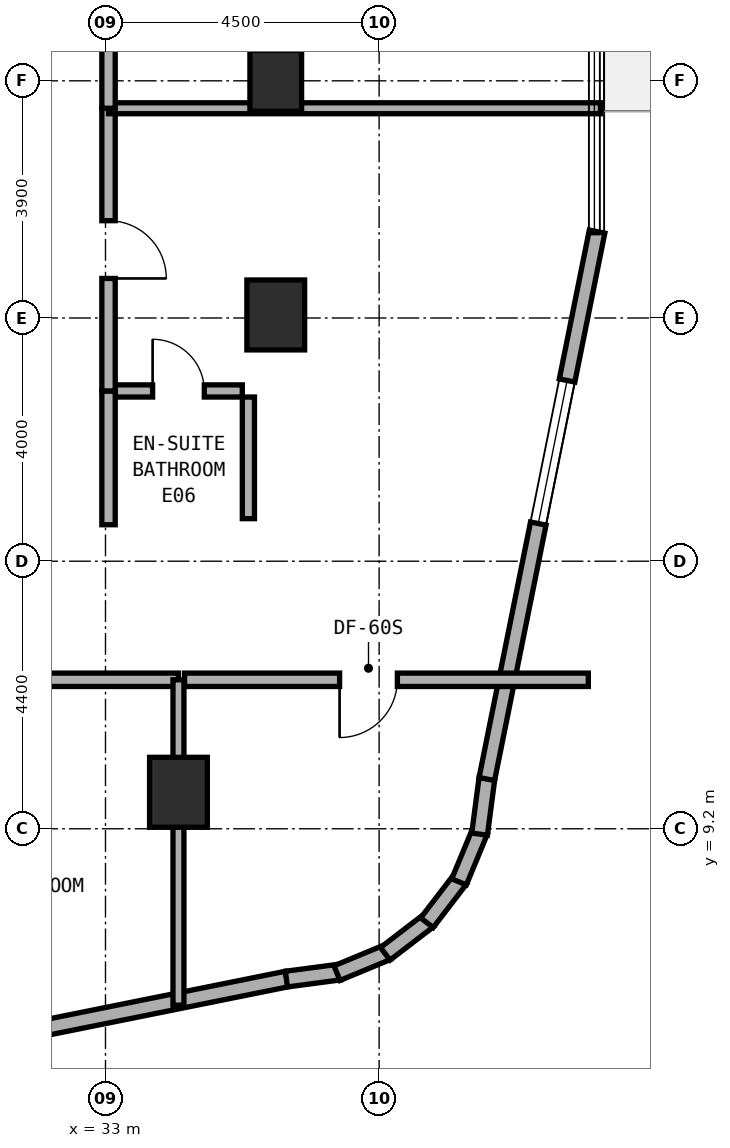
"""IFC4 building model, lengths in metres.
Left out: names, types, materials, properties, quantities, classifications, styles, units other than length and angle.
Written with IfcOpenShell. Run it as: python <this file> out.ifc"""

import sys

from ifc_helpers import new_model, si_unit, direction, frame, frame_2d, origin, origin_2d, place, context, subcontext, project, spatial, rectangle, extrude, element, fill, save


model = new_model("IFC4")
c1 = context("Model", 3, precision=1e-05, world=origin(), true_north=direction((0.0, 1.0)))
c2 = subcontext(c1, "Body", "Model", "MODEL_VIEW")
j1 = project(units=[si_unit("LENGTHUNIT", "METRE"), si_unit("PLANEANGLEUNIT", "RADIAN")], contexts=[c1])
p1 = place(None, origin())
s1 = spatial("IfcSite", under=j1, at=p1, CompositionType="ELEMENT")
p2 = place(p1, origin())
s2 = spatial("IfcBuilding", under=s1, at=p2, CompositionType="ELEMENT")
p3 = place(p2, frame((0.0, 0.0, 124.0)))
s3 = spatial("IfcBuildingStorey", under=s2, at=p3, CompositionType="ELEMENT", Elevation=124.0)
p4 = place(p3, frame((34.2, 9.8, 0.0), z_axis=(0.0, 0.0, 1.0), x_axis=(1.0, 0.0, 0.0)))
e1 = element("IfcColumn", 1, at=p4, inside=s3, PredefinedType="COLUMN", context=c2, shape_type="SweptSolid", body=[
    extrude(rectangle(XDim=0.95, YDim=1.15, at=origin_2d()), origin(), (0.0, 0.0, 1.0), 3.5),
])
p5 = place(p3, frame((35.8, 21.5, 0.0), z_axis=(0.0, 0.0, 1.0), x_axis=(1.0, 0.0, 0.0)))
e2 = element("IfcColumn", 2, at=p5, inside=s3, PredefinedType="COLUMN", context=c2, shape_type="SweptSolid", body=[
    extrude(rectangle(XDim=0.85, YDim=1.0, at=origin_2d()), origin(), (0.0, 0.0, 1.0), 3.5),
])
p6 = place(p3, frame((35.8, 17.65, 0.0), z_axis=(0.0, 0.0, 1.0), x_axis=(1.0, 0.0, 0.0)))
e3 = element("IfcColumn", 3, at=p6, inside=s3, PredefinedType="COLUMN", context=c2, shape_type="SweptSolid", body=[
    extrude(rectangle(XDim=0.95, YDim=1.15, at=origin_2d()), origin(), (0.0, 0.0, 1.0), 3.5),
])
p7 = place(p3, frame((27.009, 4.922, 0.0), z_axis=(0.0, 0.0, 1.0), x_axis=(0.980321298532, 0.197408590603, 0.0)))
e4 = element("IfcWall", 4, at=p7, inside=s3, PredefinedType="STANDARD", context=c2, shape_type="SweptSolid", body=[
    extrude(rectangle(XDim=9.153, YDim=0.26, at=frame_2d((4.577, 0.0))), origin(), (0.0, 0.0, 1.0), 3.22),
])
p8 = place(p7, frame((2.431, 0.0, 0.8)))
e5 = element("IfcOpeningElement", 5, at=p8, cuts=e4, PredefinedType="OPENING", context=c2, shape_type="SweptSolid", body=[
    extrude(rectangle(XDim=2.4, YDim=1.6, at=frame_2d((1.2, 0.8))), frame((0.0, 0.14, 0.0), z_axis=(0.0, -1.0, 0.0), x_axis=(1.0, 0.0, 0.0)), (0.0, 0.0, 1.0), 0.28),
])
p9 = place(p3, frame((35.975, 6.728, 0.0), z_axis=(0.0, 0.0, 1.0), x_axis=(0.991388484223, 0.130953706898, 0.0)))
e6 = element("IfcWall", 6, at=p9, inside=s3, PredefinedType="STANDARD", context=c2, shape_type="SweptSolid", body=[
    extrude(rectangle(XDim=0.885, YDim=0.26, at=frame_2d((0.443, 0.0))), origin(), (0.0, 0.0, 1.0), 3.22),
])
p10 = place(p3, frame((36.807, 6.826, 0.0), z_axis=(0.0, 0.0, 1.0), x_axis=(0.923627776508, 0.383290660547, 0.0)))
e7 = element("IfcWall", 7, at=p10, inside=s3, PredefinedType="STANDARD", context=c2, shape_type="SweptSolid", body=[
    extrude(rectangle(XDim=0.903, YDim=0.26, at=frame_2d((0.452, 0.0))), origin(), (0.0, 0.0, 1.0), 3.22),
])
p11 = place(p3, frame((37.601, 7.144, 0.0), z_axis=(0.0, 0.0, 1.0), x_axis=(0.793458244748, 0.608624690463, 0.0)))
e8 = element("IfcWall", 8, at=p11, inside=s3, PredefinedType="STANDARD", context=c2, shape_type="SweptSolid", body=[
    extrude(rectangle(XDim=0.902, YDim=0.26, at=frame_2d((0.451, 0.0))), origin(), (0.0, 0.0, 1.0), 3.22),
])
p12 = place(p3, frame((38.286, 7.655, 0.0), z_axis=(0.0, 0.0, 1.0), x_axis=(0.608494022858, 0.793558456666, 0.0)))
e9 = element("IfcWall", 9, at=p12, inside=s3, PredefinedType="STANDARD", context=c2, shape_type="SweptSolid", body=[
    extrude(rectangle(XDim=0.902, YDim=0.26, at=frame_2d((0.451, 0.0))), origin(), (0.0, 0.0, 1.0), 3.22),
])
p13 = place(p3, frame((38.814, 8.327, 0.0), z_axis=(0.0, 0.0, 1.0), x_axis=(0.383155708213, 0.923683767999, 0.0)))
e10 = element("IfcWall", 10, at=p13, inside=s3, PredefinedType="STANDARD", context=c2, shape_type="SweptSolid", body=[
    extrude(rectangle(XDim=0.903, YDim=0.26, at=frame_2d((0.451, 0.0))), origin(), (0.0, 0.0, 1.0), 3.22),
])
p14 = place(p3, frame((39.152, 9.112, 0.0), z_axis=(0.0, 0.0, 1.0), x_axis=(0.130200706103, 0.991487658083, 0.0)))
e11 = element("IfcWall", 11, at=p14, inside=s3, PredefinedType="STANDARD", context=c2, shape_type="SweptSolid", body=[
    extrude(rectangle(XDim=0.921, YDim=0.26, at=frame_2d((0.46, 0.0))), origin(), (0.0, 0.0, 1.0), 3.22),
])
p15 = place(p3, frame((39.271, 10.018, 0.0), z_axis=(0.0, 0.0, 1.0), x_axis=(0.197435082048, 0.980315963543, 0.0)))
e12 = element("IfcWall", 12, at=p15, inside=s3, PredefinedType="STANDARD", context=c2, shape_type="SweptSolid", body=[
    extrude(rectangle(XDim=9.183, YDim=0.26, at=frame_2d((4.591, 0.0))), origin(), (0.0, 0.0, 1.0), 3.22),
])
p16 = place(p15, frame((4.286, 0.0, 0.8)))
e13 = element("IfcOpeningElement", 13, at=p16, cuts=e12, PredefinedType="OPENING", context=c2, shape_type="SweptSolid", body=[
    extrude(rectangle(XDim=2.4, YDim=1.6, at=frame_2d((1.2, 0.8))), frame((0.0, 0.14, 0.0), z_axis=(0.0, -1.0, 0.0), x_axis=(1.0, 0.0, 0.0)), (0.0, 0.0, 1.0), 0.28),
])
p17 = place(p3, frame((28.0, 11.65, 0.0), z_axis=(0.0, 0.0, 1.0), x_axis=(1.0, 0.0, 0.0)))
e14 = element("IfcWall", 14, at=p17, inside=s3, PredefinedType="SOLIDWALL", context=c2, shape_type="SweptSolid", body=[
    extrude(rectangle(XDim=6.2, YDim=0.22, at=frame_2d((3.1, 0.0))), origin(), (0.0, 0.0, 1.0), 2.695),
])
p18 = place(p17, frame((2.625, 0.0, 0.0)))
e15 = element("IfcOpeningElement", 15, at=p18, cuts=e14, PredefinedType="OPENING", context=c2, shape_type="SweptSolid", body=[
    extrude(rectangle(XDim=0.95, YDim=2.1, at=frame_2d((0.475, 1.05))), frame((0.0, 0.12, 0.0), z_axis=(0.0, -1.0, 0.0), x_axis=(1.0, 0.0, 0.0)), (0.0, 0.0, 1.0), 0.24),
])
p19 = place(p3, frame((34.2, 6.299, 0.0), z_axis=(0.0, 0.0, 1.0), x_axis=(0.0, 1.0, 0.0)))
e16 = element("IfcWall", 16, at=p19, inside=s3, PredefinedType="SOLIDWALL", context=c2, shape_type="SweptSolid", body=[
    extrude(rectangle(XDim=5.351, YDim=0.18, at=frame_2d((2.675, 0.0))), origin(), (0.0, 0.0, 1.0), 2.695),
])
p20 = place(p3, frame((34.3, 11.65, 0.0), z_axis=(0.0, 0.0, 1.0), x_axis=(1.0, 0.0, 0.0)))
e17 = element("IfcWall", 17, at=p20, inside=s3, PredefinedType="SOLIDWALL", context=c2, shape_type="SweptSolid", body=[
    extrude(rectangle(XDim=6.64, YDim=0.22, at=frame_2d((3.32, 0.0))), origin(), (0.0, 0.0, 1.0), 2.835),
])
p21 = place(p20, frame((2.55, 0.0, 0.0)))
e18 = element("IfcOpeningElement", 18, at=p21, cuts=e17, PredefinedType="OPENING", context=c2, shape_type="SweptSolid", body=[
    extrude(rectangle(XDim=0.95, YDim=2.1, at=frame_2d((0.475, 1.05))), frame((0.0, 0.12, 0.0), z_axis=(0.0, -1.0, 0.0), x_axis=(1.0, 0.0, 0.0)), (0.0, 0.0, 1.0), 0.24),
])
p22 = place(p3, frame((33.15, 16.4, 0.0), z_axis=(0.0, 0.0, 1.0), x_axis=(1.0, 0.0, 0.0)))
e19 = element("IfcWall", 19, at=p22, inside=s3, PredefinedType="PLUMBINGWALL", context=c2, shape_type="SweptSolid", body=[
    extrude(rectangle(XDim=2.1, YDim=0.2, at=frame_2d((1.05, 0.0))), origin(), (0.0, 0.0, 1.0), 3.22),
])
p23 = place(p22, frame((0.625, 0.0, 0.0)))
e20 = element("IfcOpeningElement", 20, at=p23, cuts=e19, PredefinedType="OPENING", context=c2, shape_type="SweptSolid", body=[
    extrude(rectangle(XDim=0.85, YDim=2.1, at=frame_2d((0.425, 1.05))), frame((0.0, 0.11, 0.0), z_axis=(0.0, -1.0, 0.0), x_axis=(1.0, 0.0, 0.0)), (0.0, 0.0, 1.0), 0.22),
])
p24 = place(p3, frame((35.35, 14.3, 0.0), z_axis=(0.0, 0.0, 1.0), x_axis=(0.0, 1.0, 0.0)))
e21 = element("IfcWall", 21, at=p24, inside=s3, PredefinedType="PLUMBINGWALL", context=c2, shape_type="SweptSolid", body=[
    extrude(rectangle(XDim=2.0, YDim=0.2, at=frame_2d((1.0, 0.0))), origin(), (0.0, 0.0, 1.0), 2.835),
])
p25 = place(p3, frame((33.05, 14.2, 0.0), z_axis=(0.0, 0.0, 1.0), x_axis=(0.0, 1.0, 0.0)))
e22 = element("IfcWall", 22, at=p25, inside=s3, PredefinedType="SOLIDWALL", context=c2, shape_type="SweptSolid", body=[
    extrude(rectangle(XDim=2.2, YDim=0.22, at=frame_2d((1.1, 0.0))), origin(), (0.0, 0.0, 1.0), 3.22),
])
p26 = place(p3, frame((33.05, 16.4, 0.0), z_axis=(0.0, 0.0, 1.0), x_axis=(0.0, 1.0, 0.0)))
e23 = element("IfcWall", 23, at=p26, inside=s3, PredefinedType="SOLIDWALL", context=c2, shape_type="SweptSolid", body=[
    extrude(rectangle(XDim=4.649, YDim=0.22, at=frame_2d((2.325, 0.0))), origin(), (0.0, 0.0, 1.0), 2.695),
])
p27 = place(p26, frame((1.85, 0.0, 0.0)))
e24 = element("IfcOpeningElement", 24, at=p27, cuts=e23, PredefinedType="OPENING", context=c2, shape_type="SweptSolid", body=[
    extrude(rectangle(XDim=0.95, YDim=2.1, at=frame_2d((0.475, 1.05))), frame((0.0, 0.12, 0.0), z_axis=(0.0, -1.0, 0.0), x_axis=(1.0, 0.0, 0.0)), (0.0, 0.0, 1.0), 0.24),
])
p28 = place(p3, frame((33.05, 21.049, 0.0), z_axis=(0.0, 0.0, 1.0), x_axis=(1.0, 0.0, 0.0)))
e25 = element("IfcWall", 25, at=p28, inside=s3, PredefinedType="SOLIDWALL", context=c2, shape_type="SweptSolid", body=[
    extrude(rectangle(XDim=8.09, YDim=0.18, at=frame_2d((4.045, 0.0))), origin(), (0.0, 0.0, 1.0), 2.835),
])
p29 = place(p3, frame((33.05, 21.049, 0.0), z_axis=(0.0, 0.0, 1.0), x_axis=(0.0, 1.0, 0.0)))
e26 = element("IfcWall", 26, at=p29, inside=s3, PredefinedType="SOLIDWALL", context=c2, shape_type="SweptSolid", body=[
    extrude(rectangle(XDim=5.144, YDim=0.22, at=frame_2d((2.572, 0.0))), origin(), (0.0, 0.0, 1.0), 2.695),
])
p30 = place(p29, frame((2.097, 0.0, 0.0)))
e27 = element("IfcOpeningElement", 27, at=p30, cuts=e26, PredefinedType="OPENING", context=c2, shape_type="SweptSolid", body=[
    extrude(rectangle(XDim=0.95, YDim=2.1, at=frame_2d((0.475, 1.05))), frame((0.0, 0.12, 0.0), z_axis=(0.0, -1.0, 0.0), x_axis=(1.0, 0.0, 0.0)), (0.0, 0.0, 1.0), 0.24),
])
p31 = place(p16, origin())
e28 = element("IfcWindow", 28, at=p31, inside=s3, PartitioningType="SINGLE_PANEL", PredefinedType="WINDOW", context=c2, shape_type="SweptSolid", body=[
    extrude(rectangle(XDim=2.4, YDim=1.6, at=frame_2d((1.2, 0.8))), frame((0.0, 0.03, 0.0), z_axis=(0.0, -1.0, 0.0), x_axis=(1.0, 0.0, 0.0)), (0.0, 0.0, 1.0), 0.06),
])
fill(e13, e28)
p32 = place(p21, frame((0.95, 0.0, 0.0), z_axis=(0.0, 0.0, 1.0), x_axis=(-1.0, 0.0, 0.0)))
e29 = element("IfcDoor", 29, at=p32, inside=s3, OperationType="SINGLE_SWING_RIGHT", PredefinedType="DOOR", context=c2, shape_type="SweptSolid", body=[
    extrude(rectangle(XDim=0.95, YDim=2.1, at=frame_2d((0.475, 1.05))), frame((0.0, 0.025, 0.0), z_axis=(0.0, -1.0, 0.0), x_axis=(1.0, 0.0, 0.0)), (0.0, 0.0, 1.0), 0.05),
])
fill(e18, e29)
p33 = place(p23, origin())
e30 = element("IfcDoor", 30, at=p33, inside=s3, OperationType="SINGLE_SWING_LEFT", PredefinedType="DOOR", context=c2, shape_type="SweptSolid", body=[
    extrude(rectangle(XDim=0.85, YDim=2.1, at=frame_2d((0.425, 1.05))), frame((0.0, 0.025, 0.0), z_axis=(0.0, -1.0, 0.0), x_axis=(1.0, 0.0, 0.0)), (0.0, 0.0, 1.0), 0.05),
])
fill(e20, e30)
p34 = place(p27, frame((0.95, 0.0, 0.0), z_axis=(0.0, 0.0, 1.0), x_axis=(-1.0, 0.0, 0.0)))
e31 = element("IfcDoor", 31, at=p34, inside=s3, OperationType="SINGLE_SWING_RIGHT", PredefinedType="DOOR", context=c2, shape_type="SweptSolid", body=[
    extrude(rectangle(XDim=0.95, YDim=2.1, at=frame_2d((0.475, 1.05))), frame((0.0, 0.025, 0.0), z_axis=(0.0, -1.0, 0.0), x_axis=(1.0, 0.0, 0.0)), (0.0, 0.0, 1.0), 0.05),
])
fill(e24, e31)
save(model, sys.argv[1])
